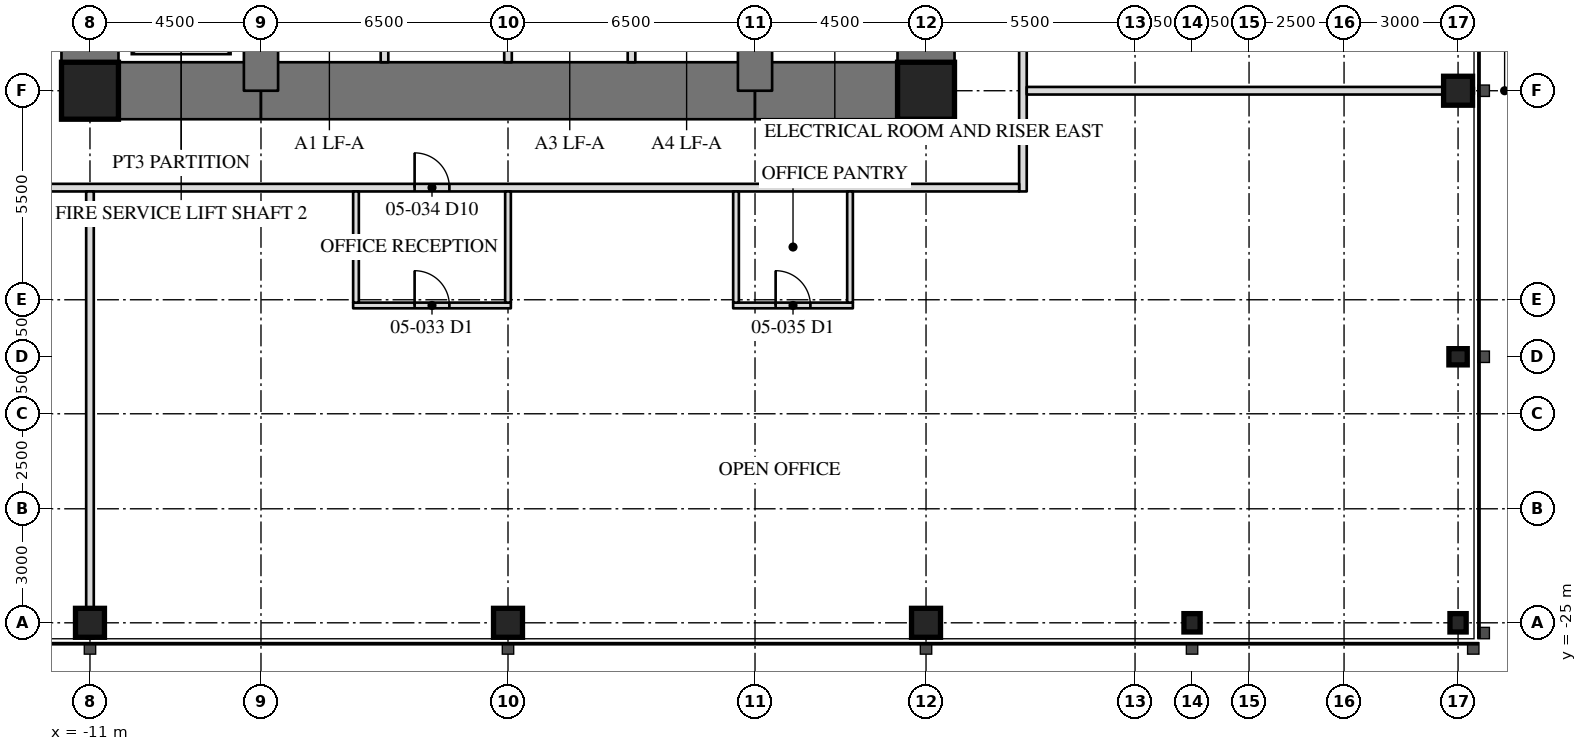
"""IFC4 building model, lengths in metres.
Left out: names, types, materials, properties, quantities, classifications, styles, units other than length and angle.
Written with IfcOpenShell. Run it as: python <this file> out.ifc"""

import sys

from ifc_helpers import new_model, si_unit, direction, frame, frame_2d, origin, origin_2d, place, context, subcontext, project, spatial, rectangle, hollow_rectangle, i_section, extrude, element, fill, save


model = new_model("IFC4")
c1 = context("Model", 3, precision=1e-05, world=origin(), true_north=direction((0.0, 1.0)))
c2 = subcontext(c1, "Body", "Model", "MODEL_VIEW")
j1 = project(units=[si_unit("LENGTHUNIT", "METRE"), si_unit("PLANEANGLEUNIT", "RADIAN")], contexts=[c1])
p1 = place(None, origin())
s1 = spatial("IfcSite", under=j1, at=p1, CompositionType="ELEMENT")
p2 = place(p1, origin())
s2 = spatial("IfcBuilding", under=s1, at=p2, CompositionType="ELEMENT")
p3 = place(p2, frame((0.0, 0.0, 24.2)))
s3 = spatial("IfcBuildingStorey", under=s2, at=p3, CompositionType="ELEMENT", Elevation=24.2)
for number, where, z_axis, x_axis in (
    (1, (-11.0, -25.0, 0.0), (0.0, 0.0, 1.0), (1.0, 0.0, 0.0)),
    (2, (0.0, -25.0, 0.0), (0.0, 0.0, 1.0), (1.0, 0.0, 0.0)),
    (3, (11.0, -25.0, 0.0), (0.0, 0.0, 1.0), (1.0, 0.0, 0.0)),
):
    element("IfcColumn", number, at=place(p3, frame(where, z_axis=z_axis, x_axis=x_axis)), inside=s3, PredefinedType="COLUMN", context=c2, shape_type="SweptSolid", body=[
        extrude(hollow_rectangle(XDim=0.762, YDim=0.762, WallThickness=0.127, at=origin_2d()), origin(), (0.0, 0.0, 1.0), 4.1),
    ])
for number, where, z_axis, x_axis in (
    (4, (18.0, -25.0, 0.0), (0.0, 0.0, 1.0), (1.0, 0.0, 0.0)),
    (5, (25.0, -25.0, 0.0), (0.0, 0.0, 1.0), (1.0, 0.0, 0.0)),
    (6, (25.0, -18.0, 0.0), (0.0, 0.0, 1.0), (0.0, 1.0, 0.0)),
):
    element("IfcColumn", number, at=place(p3, frame(where, z_axis=z_axis, x_axis=x_axis)), inside=s3, PredefinedType="COLUMN", context=c2, shape_type="SweptSolid", body=[
        extrude(i_section(OverallWidth=0.427, OverallDepth=0.483, WebThickness=0.051, FlangeThickness=0.082, at=origin_2d()), origin(), (0.0, 0.0, 1.0), 4.1),
    ])
p4 = place(p3, frame((25.0, -11.0, 0.0), z_axis=(0.0, 0.0, 1.0), x_axis=(0.0, 1.0, 0.0)))
e7 = element("IfcColumn", 7, at=p4, inside=s3, PredefinedType="COLUMN", context=c2, shape_type="SweptSolid", body=[
    extrude(hollow_rectangle(XDim=0.762, YDim=0.762, WallThickness=0.127, at=origin_2d()), origin(), (0.0, 0.0, 1.0), 4.1),
])
p5 = place(p3, frame((11.0, -11.0, 0.0), z_axis=(0.0, 0.0, 1.0), x_axis=(0.0, 1.0, 0.0)))
e8 = element("IfcWall", 8, at=p5, inside=s3, PredefinedType="SHEAR", context=c2, shape_type="SweptSolid", body=[
    extrude(rectangle(XDim=22.0, YDim=1.5, at=frame_2d((11.0, 0.0))), origin(), (0.0, 0.0, 1.0), 4.1),
])
p6 = place(p5, frame((15.393, 0.0, 0.0)))
e9 = element("IfcOpeningElement", 9, at=p6, cuts=e8, PredefinedType="OPENING", context=c2, shape_type="SweptSolid", body=[
    extrude(rectangle(XDim=0.915, YDim=2.134, at=frame_2d((0.458, 1.067))), frame((0.0, 0.76, 0.0), z_axis=(0.0, -1.0, 0.0), x_axis=(1.0, 0.0, 0.0)), (0.0, 0.0, 1.0), 1.52),
])
p7 = place(p3, frame((-11.0, 11.0, 0.0), z_axis=(0.0, 0.0, 1.0), x_axis=(0.0, -1.0, 0.0)))
e10 = element("IfcWall", 10, at=p7, inside=s3, PredefinedType="SHEAR", context=c2, shape_type="SweptSolid", body=[
    extrude(rectangle(XDim=22.0, YDim=1.5, at=frame_2d((11.0, 0.0))), origin(), (0.0, 0.0, 1.0), 4.1),
])
p8 = place(p7, frame((15.393, 0.0, 0.0)))
e11 = element("IfcOpeningElement", 11, at=p8, cuts=e10, PredefinedType="OPENING", context=c2, shape_type="SweptSolid", body=[
    extrude(rectangle(XDim=0.915, YDim=2.134, at=frame_2d((0.458, 1.067))), frame((0.0, 0.76, 0.0), z_axis=(0.0, -1.0, 0.0), x_axis=(1.0, 0.0, 0.0)), (0.0, 0.0, 1.0), 1.52),
])
p9 = place(p3, frame((-11.0, -11.0, 0.0), z_axis=(0.0, 0.0, 1.0), x_axis=(1.0, 0.0, 0.0)))
e12 = element("IfcWall", 12, at=p9, inside=s3, PredefinedType="SHEAR", context=c2, shape_type="SweptSolid", body=[
    extrude(rectangle(XDim=4.5, YDim=1.5, at=frame_2d((2.25, 0.0))), origin(), (0.0, 0.0, 1.0), 4.1),
])
p10 = place(p3, frame((-6.5, -11.0, 0.0), z_axis=(0.0, 0.0, 1.0), x_axis=(1.0, 0.0, 0.0)))
e13 = element("IfcWall", 13, at=p10, inside=s3, PredefinedType="SHEAR", context=c2, shape_type="SweptSolid", body=[
    extrude(rectangle(XDim=13.0, YDim=1.5, at=frame_2d((6.5, 0.0))), origin(), (0.0, 0.0, 1.0), 4.1),
])
p11 = place(p3, frame((6.5, -11.0, 0.0), z_axis=(0.0, 0.0, 1.0), x_axis=(1.0, 0.0, 0.0)))
e14 = element("IfcWall", 14, at=p11, inside=s3, PredefinedType="SHEAR", context=c2, shape_type="SweptSolid", body=[
    extrude(rectangle(XDim=4.5, YDim=1.5, at=frame_2d((2.25, 0.0))), origin(), (0.0, 0.0, 1.0), 4.1),
])
for number, where, z_axis, x_axis in (
    (15, (6.5, -11.0, 0.0), (0.0, 0.0, 1.0), (0.0, 1.0, 0.0)),
    (16, (-6.5, -6.5, 0.0), (0.0, 0.0, 1.0), (0.0, -1.0, 0.0)),
):
    element("IfcWall", number, at=place(p3, frame(where, z_axis=z_axis, x_axis=x_axis)), inside=s3, PredefinedType="SHEAR", context=c2, shape_type="SweptSolid", body=[
        extrude(rectangle(XDim=4.5, YDim=0.9, at=frame_2d((2.25, 0.0))), origin(), (0.0, 0.0, 1.0), 4.1),
    ])
for number, where, z_axis, x_axis in (
    (17, (-11.0, -11.0, 0.0), (0.0, 0.0, 1.0), (1.0, 0.0, 0.0)),
    (18, (11.0, -11.0, 0.0), (0.0, 0.0, 1.0), (1.0, 0.0, 0.0)),
):
    element("IfcColumn", number, at=place(p3, frame(where, z_axis=z_axis, x_axis=x_axis)), inside=s3, PredefinedType="COLUMN", context=c2, shape_type="SweptSolid", body=[
        extrude(hollow_rectangle(XDim=1.499, YDim=1.499, WallThickness=0.102, at=origin_2d()), origin(), (0.0, 0.0, 1.0), 4.1),
    ])
for number, where, z_axis, x_axis in (
    (19, (-3.25, -10.25, 0.0), (0.0, 0.0, 1.0), (0.0, 1.0, 0.0)),
    (20, (0.0, -10.25, 0.0), (0.0, 0.0, 1.0), (0.0, 1.0, 0.0)),
    (21, (3.25, -10.25, 0.0), (0.0, 0.0, 1.0), (0.0, 1.0, 0.0)),
):
    element("IfcWall", number, at=place(p3, frame(where, z_axis=z_axis, x_axis=x_axis)), inside=s3, PredefinedType="PARTITIONING", context=c2, shape_type="SweptSolid", body=[
        extrude(rectangle(XDim=3.3, YDim=0.2, at=frame_2d((1.65, 0.0))), origin(), (0.0, 0.0, 1.0), 3.91),
    ])
p12 = place(p3, frame((13.55, -13.65, 0.0), z_axis=(0.0, 0.0, 1.0), x_axis=(0.0, 1.0, 0.0)))
e22 = element("IfcWall", 22, at=p12, inside=s3, PredefinedType="PARTITIONING", context=c2, shape_type="SweptSolid", body=[
    extrude(rectangle(XDim=27.1, YDim=0.2, at=frame_2d((13.55, 0.0))), origin(), (0.0, 0.0, 1.0), 3.91),
])
p13 = place(p12, frame((7.192, 0.0, 0.0)))
e23 = element("IfcOpeningElement", 23, at=p13, cuts=e22, PredefinedType="OPENING", context=c2, shape_type="SweptSolid", body=[
    extrude(rectangle(XDim=0.915, YDim=2.134, at=frame_2d((0.458, 1.067))), frame((0.0, 0.11, 0.0), z_axis=(0.0, -1.0, 0.0), x_axis=(1.0, 0.0, 0.0)), (0.0, 0.0, 1.0), 0.22),
])
p14 = place(p3, frame((-13.65, -13.55, 0.0), z_axis=(0.0, 0.0, 1.0), x_axis=(1.0, 0.0, 0.0)))
e24 = element("IfcWall", 24, at=p14, inside=s3, PredefinedType="PARTITIONING", context=c2, shape_type="SweptSolid", body=[
    extrude(rectangle(XDim=27.1, YDim=0.2, at=frame_2d((13.55, 0.0))), origin(), (0.0, 0.0, 1.0), 3.91),
])
p15 = place(p14, frame((11.192, 0.0, 0.0)))
e25 = element("IfcOpeningElement", 25, at=p15, cuts=e24, PredefinedType="OPENING", context=c2, shape_type="SweptSolid", body=[
    extrude(rectangle(XDim=0.915, YDim=2.134, at=frame_2d((0.458, 1.067))), frame((0.0, 0.11, 0.0), z_axis=(0.0, -1.0, 0.0), x_axis=(1.0, 0.0, 0.0)), (0.0, 0.0, 1.0), 0.22),
])
for number, where, z_axis, x_axis in (
    (26, (-11.0, -13.65, 0.0), (0.0, 0.0, 1.0), (0.0, -1.0, 0.0)),
    (27, (13.65, -11.0, 0.0), (0.0, 0.0, 1.0), (1.0, 0.0, 0.0)),
):
    element("IfcWall", number, at=place(p3, frame(where, z_axis=z_axis, x_axis=x_axis)), inside=s3, PredefinedType="PARTITIONING", context=c2, shape_type="SweptSolid", body=[
        extrude(rectangle(XDim=11.765, YDim=0.2, at=frame_2d((5.883, 0.0))), origin(), (0.0, 0.0, 1.0), 3.13),
    ])
p16 = place(p3, frame((-4.075, -16.65, 0.0), z_axis=(0.0, 0.0, 1.0), x_axis=(1.0, 0.0, 0.0)))
e28 = element("IfcWall", 28, at=p16, inside=s3, PredefinedType="PARTITIONING", context=c2, shape_type="SweptSolid", body=[
    extrude(rectangle(XDim=4.15, YDim=0.15, at=frame_2d((2.075, 0.0))), origin(), (0.0, 0.0, 1.0), 3.91),
])
p17 = place(p16, frame((1.617, 0.0, 0.0)))
e29 = element("IfcOpeningElement", 29, at=p17, cuts=e28, PredefinedType="OPENING", context=c2, shape_type="SweptSolid", body=[
    extrude(rectangle(XDim=0.915, YDim=2.134, at=frame_2d((0.458, 1.067))), frame((0.0, 0.085, 0.0), z_axis=(0.0, -1.0, 0.0), x_axis=(1.0, 0.0, 0.0)), (0.0, 0.0, 1.0), 0.17),
])
p18 = place(p3, frame((-4.0, -16.575, 0.0), z_axis=(0.0, 0.0, 1.0), x_axis=(0.0, 1.0, 0.0)))
e30 = element("IfcWall", 30, at=p18, inside=s3, PredefinedType="PARTITIONING", context=c2, shape_type="SweptSolid", body=[
    extrude(rectangle(XDim=2.925, YDim=0.15, at=frame_2d((1.462, 0.0))), origin(), (0.0, 0.0, 1.0), 3.91),
])
p19 = place(p3, frame((0.0, -16.575, 0.0), z_axis=(0.0, 0.0, 1.0), x_axis=(0.0, 1.0, 0.0)))
e31 = element("IfcWall", 31, at=p19, inside=s3, PredefinedType="PARTITIONING", context=c2, shape_type="SweptSolid", body=[
    extrude(rectangle(XDim=2.925, YDim=0.15, at=frame_2d((1.462, 0.0))), origin(), (0.0, 0.0, 1.0), 3.13),
])
p20 = place(p3, frame((5.925, -16.65, 0.0), z_axis=(0.0, 0.0, 1.0), x_axis=(1.0, 0.0, 0.0)))
e32 = element("IfcWall", 32, at=p20, inside=s3, PredefinedType="PARTITIONING", context=c2, shape_type="SweptSolid", body=[
    extrude(rectangle(XDim=3.15, YDim=0.15, at=frame_2d((1.575, 0.0))), origin(), (0.0, 0.0, 1.0), 3.91),
])
p21 = place(p20, frame((1.117, 0.0, 0.0)))
e33 = element("IfcOpeningElement", 33, at=p21, cuts=e32, PredefinedType="OPENING", context=c2, shape_type="SweptSolid", body=[
    extrude(rectangle(XDim=0.915, YDim=2.134, at=frame_2d((0.458, 1.067))), frame((0.0, 0.085, 0.0), z_axis=(0.0, -1.0, 0.0), x_axis=(1.0, 0.0, 0.0)), (0.0, 0.0, 1.0), 0.17),
])
for number, where, z_axis, x_axis in (
    (34, (6.0, -16.575, 0.0), (0.0, 0.0, 1.0), (0.0, 1.0, 0.0)),
    (35, (9.0, -16.575, 0.0), (0.0, 0.0, 1.0), (0.0, 1.0, 0.0)),
):
    element("IfcWall", number, at=place(p3, frame(where, z_axis=z_axis, x_axis=x_axis)), inside=s3, PredefinedType="PARTITIONING", context=c2, shape_type="SweptSolid", body=[
        extrude(rectangle(XDim=2.925, YDim=0.15, at=frame_2d((1.462, 0.0))), origin(), (0.0, 0.0, 1.0), 3.91),
    ])
p22 = place(p17, origin())
e36 = element("IfcDoor", 36, at=p22, inside=s3, OperationType="SINGLE_SWING_LEFT", PredefinedType="DOOR", context=c2, shape_type="SweptSolid", body=[
    extrude(rectangle(XDim=0.915, YDim=2.134, at=frame_2d((0.458, 1.067))), frame((0.0, 0.025, 0.0), z_axis=(0.0, -1.0, 0.0), x_axis=(1.0, 0.0, 0.0)), (0.0, 0.0, 1.0), 0.05),
])
fill(e29, e36)
p23 = place(p15, origin())
e37 = element("IfcDoor", 37, at=p23, inside=s3, OperationType="SINGLE_SWING_LEFT", PredefinedType="DOOR", context=c2, shape_type="SweptSolid", body=[
    extrude(rectangle(XDim=0.915, YDim=2.134, at=frame_2d((0.458, 1.067))), frame((0.0, 0.025, 0.0), z_axis=(0.0, -1.0, 0.0), x_axis=(1.0, 0.0, 0.0)), (0.0, 0.0, 1.0), 0.05),
])
fill(e25, e37)
p24 = place(p21, origin())
e38 = element("IfcDoor", 38, at=p24, inside=s3, OperationType="SINGLE_SWING_LEFT", PredefinedType="DOOR", context=c2, shape_type="SweptSolid", body=[
    extrude(rectangle(XDim=0.915, YDim=2.134, at=frame_2d((0.458, 1.067))), frame((0.0, 0.025, 0.0), z_axis=(0.0, -1.0, 0.0), x_axis=(1.0, 0.0, 0.0)), (0.0, 0.0, 1.0), 0.05),
])
fill(e33, e38)
save(model, sys.argv[1])
